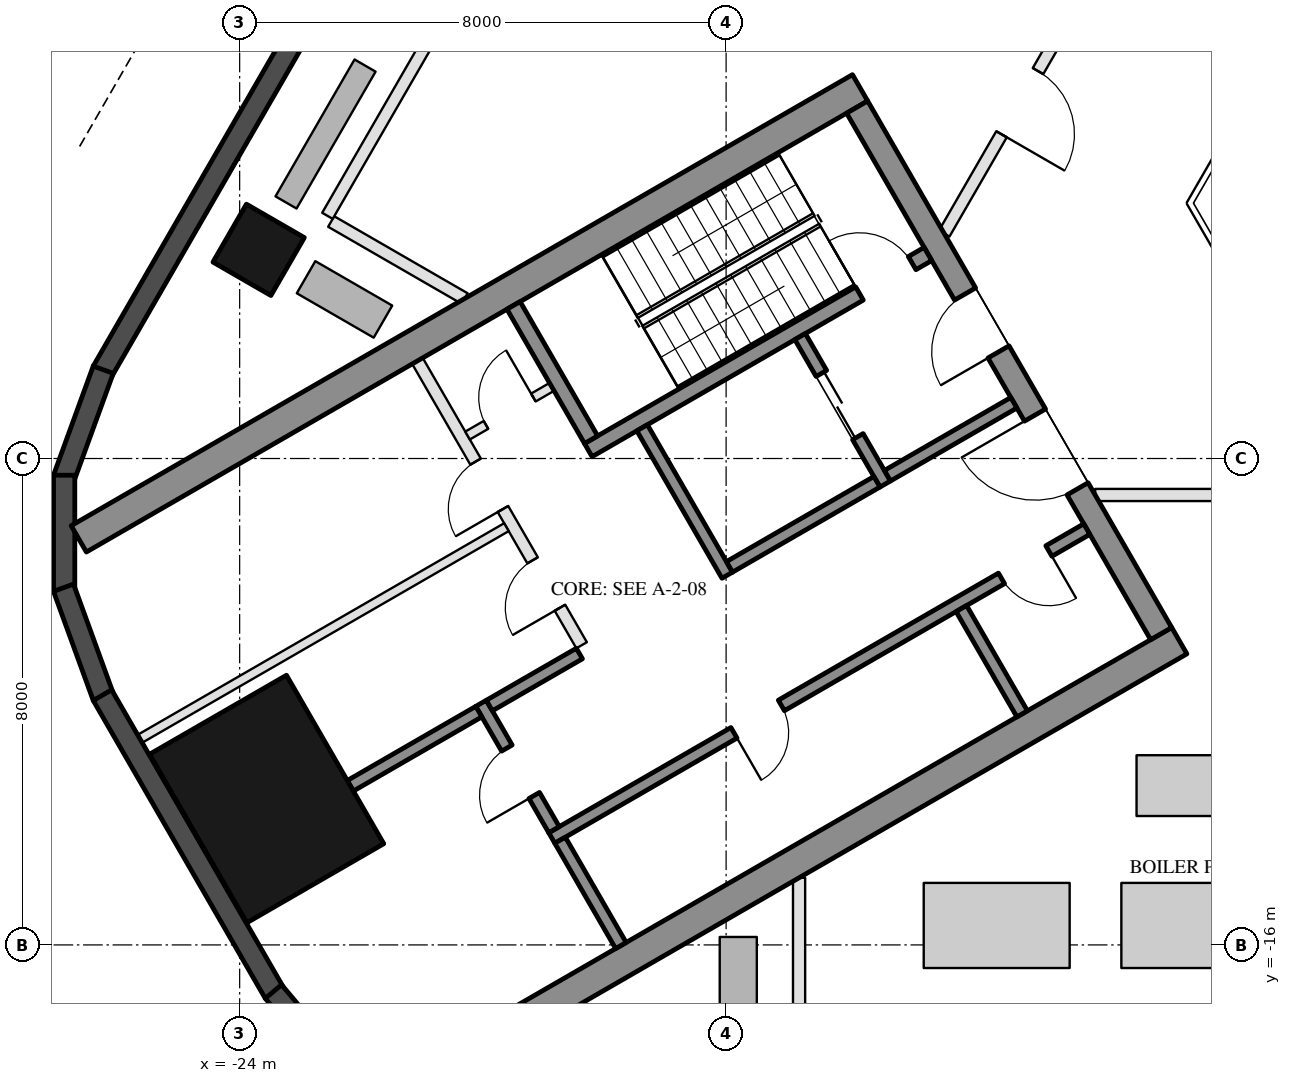
"""IFC4 building model, lengths in metres.
Left out: names, types, materials, properties, quantities, classifications, styles, units other than length and angle.
Written with IfcOpenShell. Run it as: python <this file> out.ifc"""

import sys

from ifc_helpers import new_model, si_unit, direction, frame, frame_2d, origin, origin_2d, place, context, subcontext, project, spatial, rectangle, hollow_rectangle, extrude, element, fill, save


model = new_model("IFC4")
c1 = context("Model", 3, precision=1e-05, world=origin(), true_north=direction((0.0, 1.0)))
c2 = subcontext(c1, "Body", "Model", "MODEL_VIEW")
j1 = project(units=[si_unit("LENGTHUNIT", "METRE"), si_unit("PLANEANGLEUNIT", "RADIAN")], contexts=[c1])
p1 = place(None, origin())
s1 = spatial("IfcSite", under=j1, at=p1, CompositionType="ELEMENT")
p2 = place(p1, origin())
s2 = spatial("IfcBuilding", under=s1, at=p2, CompositionType="ELEMENT")
p3 = place(p2, frame((0.0, 0.0, 42.0)))
s3 = spatial("IfcBuildingStorey", under=s2, at=p3, CompositionType="ELEMENT", Elevation=42.0)
p4 = place(p3, frame((-23.688, -4.568, 0.0), z_axis=(0.0, 0.0, 1.0), x_axis=(0.5, 0.866025403784, 0.0)))
e1 = element("IfcColumn", 1, at=p4, inside=s3, PredefinedType="COLUMN", context=c2, shape_type="SweptSolid", body=[
    extrude(hollow_rectangle(XDim=1.1, YDim=1.1, WallThickness=0.05, at=origin_2d()), origin(), (0.0, 0.0, 1.0), 4.5),
])
p5 = place(p3, frame((-23.556, -13.6, 0.0), z_axis=(0.0, 0.0, 1.0), x_axis=(-0.5, 0.866025403784, 0.0)))
e2 = element("IfcColumn", 2, at=p5, inside=s3, PredefinedType="COLUMN", context=c2, shape_type="SweptSolid", body=[
    extrude(hollow_rectangle(XDim=3.2, YDim=2.6, WallThickness=0.08, at=origin_2d()), origin(), (0.0, 0.0, 1.0), 4.5),
])
p6 = place(p3, frame((-7.441, 26.022, 0.0), z_axis=(0.0, 0.0, 1.0), x_axis=(-0.499998380999, -0.866026338513, 0.0)))
e3 = element("IfcWall", 3, at=p6, inside=s3, PredefinedType="SOLIDWALL", context=c2, shape_type="SweptSolid", body=[
    extrude(rectangle(XDim=37.631, YDim=0.35, at=frame_2d((18.816, 0.0))), origin(), (0.0, 0.0, 1.0), 4.35),
])
for number, where, z_axis, x_axis in (
    (4, (-26.244, -6.54, 0.0), (0.0, 0.0, 1.0), (-0.342, -0.94, 0.0)),
    (5, (-26.886, -8.275, 0.0), (0.0, 0.0, 1.0), (0.0, -1.0, 0.0)),
    (6, (-26.897, -10.125, 0.0), (0.0, 0.0, 1.0), (0.342, -0.94, 0.0)),
):
    element("IfcWall", number, at=place(p3, frame(where, z_axis=z_axis, x_axis=x_axis)), inside=s3, PredefinedType="SOLIDWALL", context=c2, shape_type="SweptSolid", body=[
        extrude(rectangle(XDim=1.91, YDim=0.35, at=frame_2d((0.955, 0.0))), origin(), (0.0, 0.0, 1.0), 4.35),
    ])
p7 = place(p3, frame((-26.256, -11.893, 0.0), z_axis=(0.0, 0.0, 1.0), x_axis=(0.499986410639, -0.866033249463, 0.0)))
e7 = element("IfcWall", 7, at=p7, inside=s3, PredefinedType="SOLIDWALL", context=c2, shape_type="SweptSolid", body=[
    extrude(rectangle(XDim=5.658, YDim=0.35, at=frame_2d((2.829, 0.0))), origin(), (0.0, 0.0, 1.0), 4.35),
])
p8 = place(p3, frame((-23.445, -16.768, 0.0), z_axis=(0.0, 0.0, 1.0), x_axis=(0.642808304945, -0.766027077259, 0.0)))
e8 = element("IfcWall", 8, at=p8, inside=s3, PredefinedType="SOLIDWALL", context=c2, shape_type="SweptSolid", body=[
    extrude(rectangle(XDim=1.91, YDim=0.35, at=frame_2d((0.955, 0.0))), origin(), (0.0, 0.0, 1.0), 4.35),
])
for number, where, z_axis, x_axis in (
    (9, (-13.797, -1.903, 0.0), (0.0, 0.0, 1.0), (-0.866, -0.5, 0.0)),
    (10, (-8.547, -10.997, 0.0), (0.0, 0.0, 1.0), (-0.866, -0.5, 0.0)),
):
    element("IfcWall", number, at=place(p3, frame(where, z_axis=z_axis, x_axis=x_axis)), inside=s3, PredefinedType="SHEAR", context=c2, shape_type="SweptSolid", body=[
        extrude(rectangle(XDim=14.837, YDim=0.5, at=frame_2d((7.418, 0.0))), origin(), (0.0, 0.0, 1.0), 4.3),
    ])
p9 = place(p3, frame((-13.845, -2.22, 0.0), z_axis=(0.0, 0.0, 1.0), x_axis=(0.500004234368, -0.866022959057, 0.0)))
e11 = element("IfcWall", 11, at=p9, inside=s3, PredefinedType="SHEAR", context=c2, shape_type="SweptSolid", body=[
    extrude(rectangle(XDim=10.0, YDim=0.4, at=frame_2d((5.0, 0.0))), origin(), (0.0, 0.0, 1.0), 4.3),
])
p10 = place(p9, frame((3.55, 0.0, 0.0)))
e12 = element("IfcOpeningElement", 12, at=p10, cuts=e11, PredefinedType="OPENING", context=c2, shape_type="SweptSolid", body=[
    extrude(rectangle(XDim=1.1, YDim=2.1, at=frame_2d((0.55, 1.05))), frame((0.0, 0.21, 0.0), z_axis=(0.0, -1.0, 0.0), x_axis=(1.0, 0.0, 0.0)), (0.0, 0.0, 1.0), 0.42),
])
p11 = place(p9, frame((5.85, 0.0, 0.0)))
e13 = element("IfcOpeningElement", 13, at=p11, cuts=e11, PredefinedType="OPENING", context=c2, shape_type="SweptSolid", body=[
    extrude(rectangle(XDim=1.4, YDim=2.1, at=frame_2d((0.7, 1.05))), frame((0.0, 0.21, 0.0), z_axis=(0.0, -1.0, 0.0), x_axis=(1.0, 0.0, 0.0)), (0.0, 0.0, 1.0), 0.42),
])
p12 = place(p3, frame((-12.681, -4.636, 0.0), z_axis=(0.0, 0.0, 1.0), x_axis=(-0.866021702275, -0.500006411147, 0.0)))
e14 = element("IfcWall", 14, at=p12, inside=s3, PredefinedType="SHEAR", context=c2, shape_type="SweptSolid", body=[
    extrude(rectangle(XDim=6.45, YDim=0.25, at=frame_2d((3.225, 0.0))), origin(), (0.0, 0.0, 1.0), 4.3),
])
p13 = place(p12, frame((0.3, 0.0, 0.0)))
e15 = element("IfcOpeningElement", 15, at=p13, cuts=e14, PredefinedType="OPENING", context=c2, shape_type="SweptSolid", body=[
    extrude(rectangle(XDim=1.0, YDim=2.1, at=frame_2d((0.5, 1.05))), frame((0.0, 0.135, 0.0), z_axis=(0.0, -1.0, 0.0), x_axis=(1.0, 0.0, 0.0)), (0.0, 0.0, 1.0), 0.27),
])
p14 = place(p3, frame((-19.496, -5.482, 0.0), z_axis=(0.0, 0.0, 1.0), x_axis=(0.499990435942, -0.866030925526, 0.0)))
e16 = element("IfcWall", 16, at=p14, inside=s3, PredefinedType="SHEAR", context=c2, shape_type="SweptSolid", body=[
    extrude(rectangle(XDim=2.55, YDim=0.25, at=frame_2d((1.275, 0.0))), origin(), (0.0, 0.0, 1.0), 4.3),
])
p15 = place(p3, frame((-17.381, -7.495, 0.0), z_axis=(0.0, 0.0, 1.0), x_axis=(0.500011755427, -0.866018616679, 0.0)))
e17 = element("IfcWall", 17, at=p15, inside=s3, PredefinedType="SHEAR", context=c2, shape_type="SweptSolid", body=[
    extrude(rectangle(XDim=2.8, YDim=0.2, at=frame_2d((1.4, 0.0))), origin(), (0.0, 0.0, 1.0), 4.3),
])
p16 = place(p3, frame((-14.783, -5.995, 0.0), z_axis=(0.0, 0.0, 1.0), x_axis=(0.49994636267, -0.866056369097, 0.0)))
e18 = element("IfcWall", 18, at=p16, inside=s3, PredefinedType="SHEAR", context=c2, shape_type="SweptSolid", body=[
    extrude(rectangle(XDim=2.8, YDim=0.2, at=frame_2d((1.4, 0.0))), origin(), (0.0, 0.0, 1.0), 4.3),
])
p17 = place(p16, frame((0.7, 0.0, 0.0)))
e19 = element("IfcOpeningElement", 19, at=p17, cuts=e18, PredefinedType="OPENING", context=c2, shape_type="SweptSolid", body=[
    extrude(rectangle(XDim=1.2, YDim=2.1, at=frame_2d((0.6, 1.05))), frame((0.0, 0.11, 0.0), z_axis=(0.0, -1.0, 0.0), x_axis=(1.0, 0.0, 0.0)), (0.0, 0.0, 1.0), 0.22),
])
p18 = place(p3, frame((-13.52, -8.383, 0.0), z_axis=(0.0, 0.0, 1.0), x_axis=(-0.866034573852, -0.49998411664, 0.0)))
e20 = element("IfcWall", 20, at=p18, inside=s3, PredefinedType="SHEAR", context=c2, shape_type="SweptSolid", body=[
    extrude(rectangle(XDim=2.8, YDim=0.2, at=frame_2d((1.4, 0.0))), origin(), (0.0, 0.0, 1.0), 4.3),
])
p19 = place(p3, frame((-11.268, -7.083, 0.0), z_axis=(0.0, 0.0, 1.0), x_axis=(-0.866050077142, -0.499957262057, 0.0)))
e21 = element("IfcWall", 21, at=p19, inside=s3, PredefinedType="SHEAR", context=c2, shape_type="SweptSolid", body=[
    extrude(rectangle(XDim=2.4, YDim=0.2, at=frame_2d((1.2, 0.0))), origin(), (0.0, 0.0, 1.0), 4.3),
])
p20 = place(p3, frame((-10.068, -9.162, 0.0), z_axis=(0.0, 0.0, 1.0), x_axis=(-0.866032725843, -0.499987317609, 0.0)))
e22 = element("IfcWall", 22, at=p20, inside=s3, PredefinedType="SHEAR", context=c2, shape_type="SweptSolid", body=[
    extrude(rectangle(XDim=10.16, YDim=0.2, at=frame_2d((5.08, 0.0))), origin(), (0.0, 0.0, 1.0), 4.3),
])
p21 = place(p20, frame((0.72, 0.0, 0.0)))
e23 = element("IfcOpeningElement", 23, at=p21, cuts=e22, PredefinedType="OPENING", context=c2, shape_type="SweptSolid", body=[
    extrude(rectangle(XDim=0.9, YDim=2.1, at=frame_2d((0.45, 1.05))), frame((0.0, 0.11, 0.0), z_axis=(0.0, -1.0, 0.0), x_axis=(1.0, 0.0, 0.0)), (0.0, 0.0, 1.0), 0.22),
])
p22 = place(p20, frame((5.8, 0.0, 0.0)))
e24 = element("IfcOpeningElement", 24, at=p22, cuts=e22, PredefinedType="OPENING", context=c2, shape_type="SweptSolid", body=[
    extrude(rectangle(XDim=0.9, YDim=2.1, at=frame_2d((0.45, 1.05))), frame((0.0, 0.11, 0.0), z_axis=(0.0, -1.0, 0.0), x_axis=(1.0, 0.0, 0.0)), (0.0, 0.0, 1.0), 0.22),
])
p23 = place(p3, frame((-20.031, -12.026, 0.0), z_axis=(0.0, 0.0, 1.0), x_axis=(0.500033551112, -0.866006032174, 0.0)))
e25 = element("IfcWall", 25, at=p23, inside=s3, PredefinedType="SHEAR", context=c2, shape_type="SweptSolid", body=[
    extrude(rectangle(XDim=2.4, YDim=0.2, at=frame_2d((1.2, 0.0))), origin(), (0.0, 0.0, 1.0), 4.3),
])
p24 = place(p23, frame((0.85, 0.0, 0.0)))
e26 = element("IfcOpeningElement", 26, at=p24, cuts=e25, PredefinedType="OPENING", context=c2, shape_type="SweptSolid", body=[
    extrude(rectangle(XDim=0.9, YDim=2.1, at=frame_2d((0.45, 1.05))), frame((0.0, 0.11, 0.0), z_axis=(0.0, -1.0, 0.0), x_axis=(1.0, 0.0, 0.0)), (0.0, 0.0, 1.0), 0.22),
])
p25 = place(p3, frame((-18.413, -11.208, 0.0), z_axis=(0.0, 0.0, 1.0), x_axis=(-0.866038183914, -0.499977863513, 0.0)))
e27 = element("IfcWall", 27, at=p25, inside=s3, PredefinedType="SHEAR", context=c2, shape_type="SweptSolid", body=[
    extrude(rectangle(XDim=1.71, YDim=0.2, at=frame_2d((0.855, 0.0))), origin(), (0.0, 0.0, 1.0), 4.3),
])
for number, where, z_axis, x_axis in (
    (28, (-12.131, -10.468, 0.0), (0.0, 0.0, 1.0), (0.5, -0.866, 0.0)),
    (29, (-18.73, -14.278, 0.0), (0.0, 0.0, 1.0), (0.5, -0.866, 0.0)),
):
    element("IfcWall", number, at=place(p3, frame(where, z_axis=z_axis, x_axis=x_axis)), inside=s3, PredefinedType="SHEAR", context=c2, shape_type="SweptSolid", body=[
        extrude(rectangle(XDim=2.0, YDim=0.2, at=frame_2d((1.0, 0.0))), origin(), (0.0, 0.0, 1.0), 4.3),
    ])
p26 = place(p3, frame((-20.067, -12.163, 0.0), z_axis=(0.0, 0.0, 1.0), x_axis=(-0.866048967903, -0.499959183527, 0.0)))
e30 = element("IfcWall", 30, at=p26, inside=s3, PredefinedType="SHEAR", context=c2, shape_type="SweptSolid", body=[
    extrude(rectangle(XDim=2.44, YDim=0.2, at=frame_2d((1.22, 0.0))), origin(), (0.0, 0.0, 1.0), 4.3),
])
p27 = place(p3, frame((-21.076, -6.395, 0.0), z_axis=(0.0, 0.0, 1.0), x_axis=(0.50001468107, -0.866016927499, 0.0)))
e31 = element("IfcWall", 31, at=p27, inside=s3, PredefinedType="PARTITIONING", context=c2, shape_type="SweptSolid", body=[
    extrude(rectangle(XDim=5.4, YDim=0.2, at=frame_2d((2.7, 0.0))), origin(), (0.0, 0.0, 1.0), 4.3),
])
p28 = place(p27, frame((1.913, 0.0, 0.0)))
e32 = element("IfcOpeningElement", 32, at=p28, cuts=e31, PredefinedType="OPENING", context=c2, shape_type="SweptSolid", body=[
    extrude(rectangle(XDim=0.9, YDim=2.1, at=frame_2d((0.45, 1.05))), frame((0.0, 0.11, 0.0), z_axis=(0.0, -1.0, 0.0), x_axis=(1.0, 0.0, 0.0)), (0.0, 0.0, 1.0), 0.22),
])
p29 = place(p27, frame((3.788, 0.0, 0.0)))
e33 = element("IfcOpeningElement", 33, at=p29, cuts=e31, PredefinedType="OPENING", context=c2, shape_type="SweptSolid", body=[
    extrude(rectangle(XDim=0.9, YDim=2.1, at=frame_2d((0.45, 1.05))), frame((0.0, 0.11, 0.0), z_axis=(0.0, -1.0, 0.0), x_axis=(1.0, 0.0, 0.0)), (0.0, 0.0, 1.0), 0.22),
])
p30 = place(p3, frame((-18.866, -6.822, 0.0), z_axis=(0.0, 0.0, 1.0), x_axis=(-0.866028054938, -0.499995408039, 0.0)))
e34 = element("IfcWall", 34, at=p30, inside=s3, PredefinedType="PARTITIONING", context=c2, shape_type="SweptSolid", body=[
    extrude(rectangle(XDim=1.6, YDim=0.15, at=frame_2d((0.8, 0.0))), origin(), (0.0, 0.0, 1.0), 4.3),
])
p31 = place(p30, frame((0.35, 0.0, 0.0)))
e35 = element("IfcOpeningElement", 35, at=p31, cuts=e34, PredefinedType="OPENING", context=c2, shape_type="SweptSolid", body=[
    extrude(rectangle(XDim=0.9, YDim=2.1, at=frame_2d((0.45, 1.05))), frame((0.0, 0.085, 0.0), z_axis=(0.0, -1.0, 0.0), x_axis=(1.0, 0.0, 0.0)), (0.0, 0.0, 1.0), 0.17),
])
p32 = place(p3, frame((-19.613, -9.13, 0.0), z_axis=(0.0, 0.0, 1.0), x_axis=(-0.866031734426, -0.499989034847, 0.0)))
e36 = element("IfcWall", 36, at=p32, inside=s3, PredefinedType="PARTITIONING", context=c2, shape_type="SweptSolid", body=[
    extrude(rectangle(XDim=6.95, YDim=0.15, at=frame_2d((3.475, 0.0))), origin(), (0.0, 0.0, 1.0), 4.3),
])
p33 = place(p3, frame((-14.8, -17.43, 0.0), z_axis=(0.0, 0.0, 1.0), x_axis=(0.0, 1.0, 0.0)))
e37 = element("IfcWall", 37, at=p33, inside=s3, PredefinedType="PARTITIONING", context=c2, shape_type="SweptSolid", body=[
    extrude(rectangle(XDim=2.534, YDim=0.2, at=frame_2d((1.267, 0.0))), origin(), (0.0, 0.0, 1.0), 4.35),
])
p34 = place(p3, frame((-9.93, -8.6, 0.0), z_axis=(0.0, 0.0, 1.0), x_axis=(1.0, 0.0, 0.0)))
e38 = element("IfcWall", 38, at=p34, inside=s3, PredefinedType="PARTITIONING", context=c2, shape_type="SweptSolid", body=[
    extrude(rectangle(XDim=19.861, YDim=0.2, at=frame_2d((9.93, 0.0))), origin(), (0.0, 0.0, 1.0), 3.75),
])
p35 = place(p34, frame((2.121, 0.0, 0.0)))
e39 = element("IfcOpeningElement", 39, at=p35, cuts=e38, PredefinedType="OPENING", context=c2, shape_type="SweptSolid", body=[
    extrude(rectangle(XDim=1.2, YDim=2.1, at=frame_2d((0.6, 1.05))), frame((0.0, 0.11, 0.0), z_axis=(0.0, -1.0, 0.0), x_axis=(1.0, 0.0, 0.0)), (0.0, 0.0, 1.0), 0.22),
])
p36 = place(p34, frame((8.331, 0.0, 0.0)))
e40 = element("IfcOpeningElement", 40, at=p36, cuts=e38, PredefinedType="OPENING", context=c2, shape_type="SweptSolid", body=[
    extrude(rectangle(XDim=1.2, YDim=2.1, at=frame_2d((0.6, 1.05))), frame((0.0, 0.11, 0.0), z_axis=(0.0, -1.0, 0.0), x_axis=(1.0, 0.0, 0.0)), (0.0, 0.0, 1.0), 0.22),
])
p37 = place(p34, frame((15.54, 0.0, 0.0)))
e41 = element("IfcOpeningElement", 41, at=p37, cuts=e38, PredefinedType="OPENING", context=c2, shape_type="SweptSolid", body=[
    extrude(rectangle(XDim=1.2, YDim=2.1, at=frame_2d((0.6, 1.05))), frame((0.0, 0.11, 0.0), z_axis=(0.0, -1.0, 0.0), x_axis=(1.0, 0.0, 0.0)), (0.0, 0.0, 1.0), 0.22),
])
p38 = place(p3, frame((-22.495, -4.102, 0.0), z_axis=(0.0, 0.0, 1.0), x_axis=(0.866065287345, -0.499930913282, 0.0)))
e42 = element("IfcWall", 42, at=p38, inside=s3, PredefinedType="PARTITIONING", context=c2, shape_type="SweptSolid", body=[
    extrude(rectangle(XDim=2.534, YDim=0.2, at=frame_2d((1.267, 0.0))), origin(), (0.0, 0.0, 1.0), 4.35),
])
p39 = place(p3, frame((-7.806, 21.539, 0.0), z_axis=(0.0, 0.0, 1.0), x_axis=(-0.500002084189, -0.866024200474, 0.0)))
e43 = element("IfcWall", 43, at=p39, inside=s3, PredefinedType="PARTITIONING", context=c2, shape_type="SweptSolid", body=[
    extrude(rectangle(XDim=29.5, YDim=0.2, at=frame_2d((14.75, 0.0))), origin(), (0.0, 0.0, 1.0), 3.75),
])
p40 = place(p3, frame((-2.482, 12.9, 0.0), z_axis=(0.0, 0.0, 1.0), x_axis=(-0.50000478328, -0.866022642139, 0.0)))
e44 = element("IfcWall", 44, at=p40, inside=s3, PredefinedType="PARTITIONING", context=c2, shape_type="SweptSolid", body=[
    extrude(rectangle(XDim=19.861, YDim=0.2, at=frame_2d((9.931, 0.0))), origin(), (0.0, 0.0, 1.0), 3.75),
])
p41 = place(p40, frame((1.885, 0.0, 0.0)))
e45 = element("IfcOpeningElement", 45, at=p41, cuts=e44, PredefinedType="OPENING", context=c2, shape_type="SweptSolid", body=[
    extrude(rectangle(XDim=1.2, YDim=2.1, at=frame_2d((0.6, 1.05))), frame((0.0, 0.11, 0.0), z_axis=(0.0, -1.0, 0.0), x_axis=(1.0, 0.0, 0.0)), (0.0, 0.0, 1.0), 0.22),
])
p42 = place(p40, frame((6.857, 0.0, 0.0)))
e46 = element("IfcOpeningElement", 46, at=p42, cuts=e44, PredefinedType="OPENING", context=c2, shape_type="SweptSolid", body=[
    extrude(rectangle(XDim=1.2, YDim=2.1, at=frame_2d((0.6, 1.05))), frame((0.0, 0.11, 0.0), z_axis=(0.0, -1.0, 0.0), x_axis=(1.0, 0.0, 0.0)), (0.0, 0.0, 1.0), 0.22),
])
p43 = place(p40, frame((11.804, 0.0, 0.0)))
e47 = element("IfcOpeningElement", 47, at=p43, cuts=e44, PredefinedType="OPENING", context=c2, shape_type="SweptSolid", body=[
    extrude(rectangle(XDim=1.2, YDim=2.1, at=frame_2d((0.6, 1.05))), frame((0.0, 0.11, 0.0), z_axis=(0.0, -1.0, 0.0), x_axis=(1.0, 0.0, 0.0)), (0.0, 0.0, 1.0), 0.22),
])
p44 = place(p40, frame((16.776, 0.0, 0.0)))
e48 = element("IfcOpeningElement", 48, at=p44, cuts=e44, PredefinedType="OPENING", context=c2, shape_type="SweptSolid", body=[
    extrude(rectangle(XDim=1.2, YDim=2.1, at=frame_2d((0.6, 1.05))), frame((0.0, 0.11, 0.0), z_axis=(0.0, -1.0, 0.0), x_axis=(1.0, 0.0, 0.0)), (0.0, 0.0, 1.0), 0.22),
])
p45 = place(p17, origin())
e49 = element("IfcDoor", 49, at=p45, inside=s3, OperationType="DOUBLE_DOOR_SLIDING", PredefinedType="DOOR", context=c2, shape_type="SweptSolid", body=[
    extrude(rectangle(XDim=1.2, YDim=2.1, at=frame_2d((0.6, 1.05))), frame((0.0, 0.025, 0.0), z_axis=(0.0, -1.0, 0.0), x_axis=(1.0, 0.0, 0.0)), (0.0, 0.0, 1.0), 0.05),
])
fill(e19, e49)
p46 = place(p31, frame((0.9, 0.0, 0.0), z_axis=(0.0, 0.0, 1.0), x_axis=(-1.0, 0.0, 0.0)))
e50 = element("IfcDoor", 50, at=p46, inside=s3, OperationType="SINGLE_SWING_RIGHT", PredefinedType="DOOR", context=c2, shape_type="SweptSolid", body=[
    extrude(rectangle(XDim=0.9, YDim=2.1, at=frame_2d((0.45, 1.05))), frame((0.0, 0.025, 0.0), z_axis=(0.0, -1.0, 0.0), x_axis=(1.0, 0.0, 0.0)), (0.0, 0.0, 1.0), 0.05),
])
fill(e35, e50)
p47 = place(p21, origin())
e51 = element("IfcDoor", 51, at=p47, inside=s3, OperationType="SINGLE_SWING_LEFT", PredefinedType="DOOR", context=c2, shape_type="SweptSolid", body=[
    extrude(rectangle(XDim=0.9, YDim=2.1, at=frame_2d((0.45, 1.05))), frame((0.0, 0.025, 0.0), z_axis=(0.0, -1.0, 0.0), x_axis=(1.0, 0.0, 0.0)), (0.0, 0.0, 1.0), 0.05),
])
fill(e23, e51)
p48 = place(p22, origin())
e52 = element("IfcDoor", 52, at=p48, inside=s3, OperationType="SINGLE_SWING_RIGHT", PredefinedType="DOOR", context=c2, shape_type="SweptSolid", body=[
    extrude(rectangle(XDim=0.9, YDim=2.1, at=frame_2d((0.45, 1.05))), frame((0.0, 0.025, 0.0), z_axis=(0.0, -1.0, 0.0), x_axis=(1.0, 0.0, 0.0)), (0.0, 0.0, 1.0), 0.05),
])
fill(e24, e52)
p49 = place(p24, frame((0.9, 0.0, 0.0), z_axis=(0.0, 0.0, 1.0), x_axis=(-1.0, 0.0, 0.0)))
e53 = element("IfcDoor", 53, at=p49, inside=s3, OperationType="SINGLE_SWING_LEFT", PredefinedType="DOOR", context=c2, shape_type="SweptSolid", body=[
    extrude(rectangle(XDim=0.9, YDim=2.1, at=frame_2d((0.45, 1.05))), frame((0.0, 0.025, 0.0), z_axis=(0.0, -1.0, 0.0), x_axis=(1.0, 0.0, 0.0)), (0.0, 0.0, 1.0), 0.05),
])
fill(e26, e53)
p50 = place(p28, frame((0.9, 0.0, 0.0), z_axis=(0.0, 0.0, 1.0), x_axis=(-1.0, 0.0, 0.0)))
e54 = element("IfcDoor", 54, at=p50, inside=s3, OperationType="SINGLE_SWING_LEFT", PredefinedType="DOOR", context=c2, shape_type="SweptSolid", body=[
    extrude(rectangle(XDim=0.9, YDim=2.1, at=frame_2d((0.45, 1.05))), frame((0.0, 0.025, 0.0), z_axis=(0.0, -1.0, 0.0), x_axis=(1.0, 0.0, 0.0)), (0.0, 0.0, 1.0), 0.05),
])
fill(e32, e54)
p51 = place(p29, frame((0.9, 0.0, 0.0), z_axis=(0.0, 0.0, 1.0), x_axis=(-1.0, 0.0, 0.0)))
e55 = element("IfcDoor", 55, at=p51, inside=s3, OperationType="SINGLE_SWING_LEFT", PredefinedType="DOOR", context=c2, shape_type="SweptSolid", body=[
    extrude(rectangle(XDim=0.9, YDim=2.1, at=frame_2d((0.45, 1.05))), frame((0.0, 0.025, 0.0), z_axis=(0.0, -1.0, 0.0), x_axis=(1.0, 0.0, 0.0)), (0.0, 0.0, 1.0), 0.05),
])
fill(e33, e55)
p52 = place(p10, frame((1.1, 0.0, 0.0), z_axis=(0.0, 0.0, 1.0), x_axis=(-1.0, 0.0, 0.0)))
e56 = element("IfcDoor", 56, at=p52, inside=s3, OperationType="SINGLE_SWING_LEFT", PredefinedType="DOOR", context=c2, shape_type="SweptSolid", body=[
    extrude(rectangle(XDim=1.1, YDim=2.1, at=frame_2d((0.55, 1.05))), frame((0.0, 0.025, 0.0), z_axis=(0.0, -1.0, 0.0), x_axis=(1.0, 0.0, 0.0)), (0.0, 0.0, 1.0), 0.05),
])
fill(e12, e56)
p53 = place(p11, frame((1.4, 0.0, 0.0), z_axis=(0.0, 0.0, 1.0), x_axis=(-1.0, 0.0, 0.0)))
e57 = element("IfcDoor", 57, at=p53, inside=s3, OperationType="DOUBLE_DOOR_SINGLE_SWING", PredefinedType="DOOR", context=c2, shape_type="SweptSolid", body=[
    extrude(rectangle(XDim=1.4, YDim=2.1, at=frame_2d((0.7, 1.05))), frame((0.0, 0.025, 0.0), z_axis=(0.0, -1.0, 0.0), x_axis=(1.0, 0.0, 0.0)), (0.0, 0.0, 1.0), 0.05),
])
fill(e13, e57)
p54 = place(p13, frame((1.0, 0.0, 0.0), z_axis=(0.0, 0.0, 1.0), x_axis=(-1.0, 0.0, 0.0)))
e58 = element("IfcDoor", 58, at=p54, inside=s3, OperationType="SINGLE_SWING_LEFT", PredefinedType="DOOR", context=c2, shape_type="SweptSolid", body=[
    extrude(rectangle(XDim=1.0, YDim=2.1, at=frame_2d((0.5, 1.05))), frame((0.0, 0.025, 0.0), z_axis=(0.0, -1.0, 0.0), x_axis=(1.0, 0.0, 0.0)), (0.0, 0.0, 1.0), 0.05),
])
fill(e15, e58)
p55 = place(p44, origin())
e59 = element("IfcDoor", 59, at=p55, inside=s3, OperationType="SINGLE_SWING_RIGHT", PredefinedType="DOOR", context=c2, shape_type="SweptSolid", body=[
    extrude(rectangle(XDim=1.2, YDim=2.1, at=frame_2d((0.6, 1.05))), frame((0.0, 0.025, 0.0), z_axis=(0.0, -1.0, 0.0), x_axis=(1.0, 0.0, 0.0)), (0.0, 0.0, 1.0), 0.05),
])
fill(e48, e59)
save(model, sys.argv[1])
